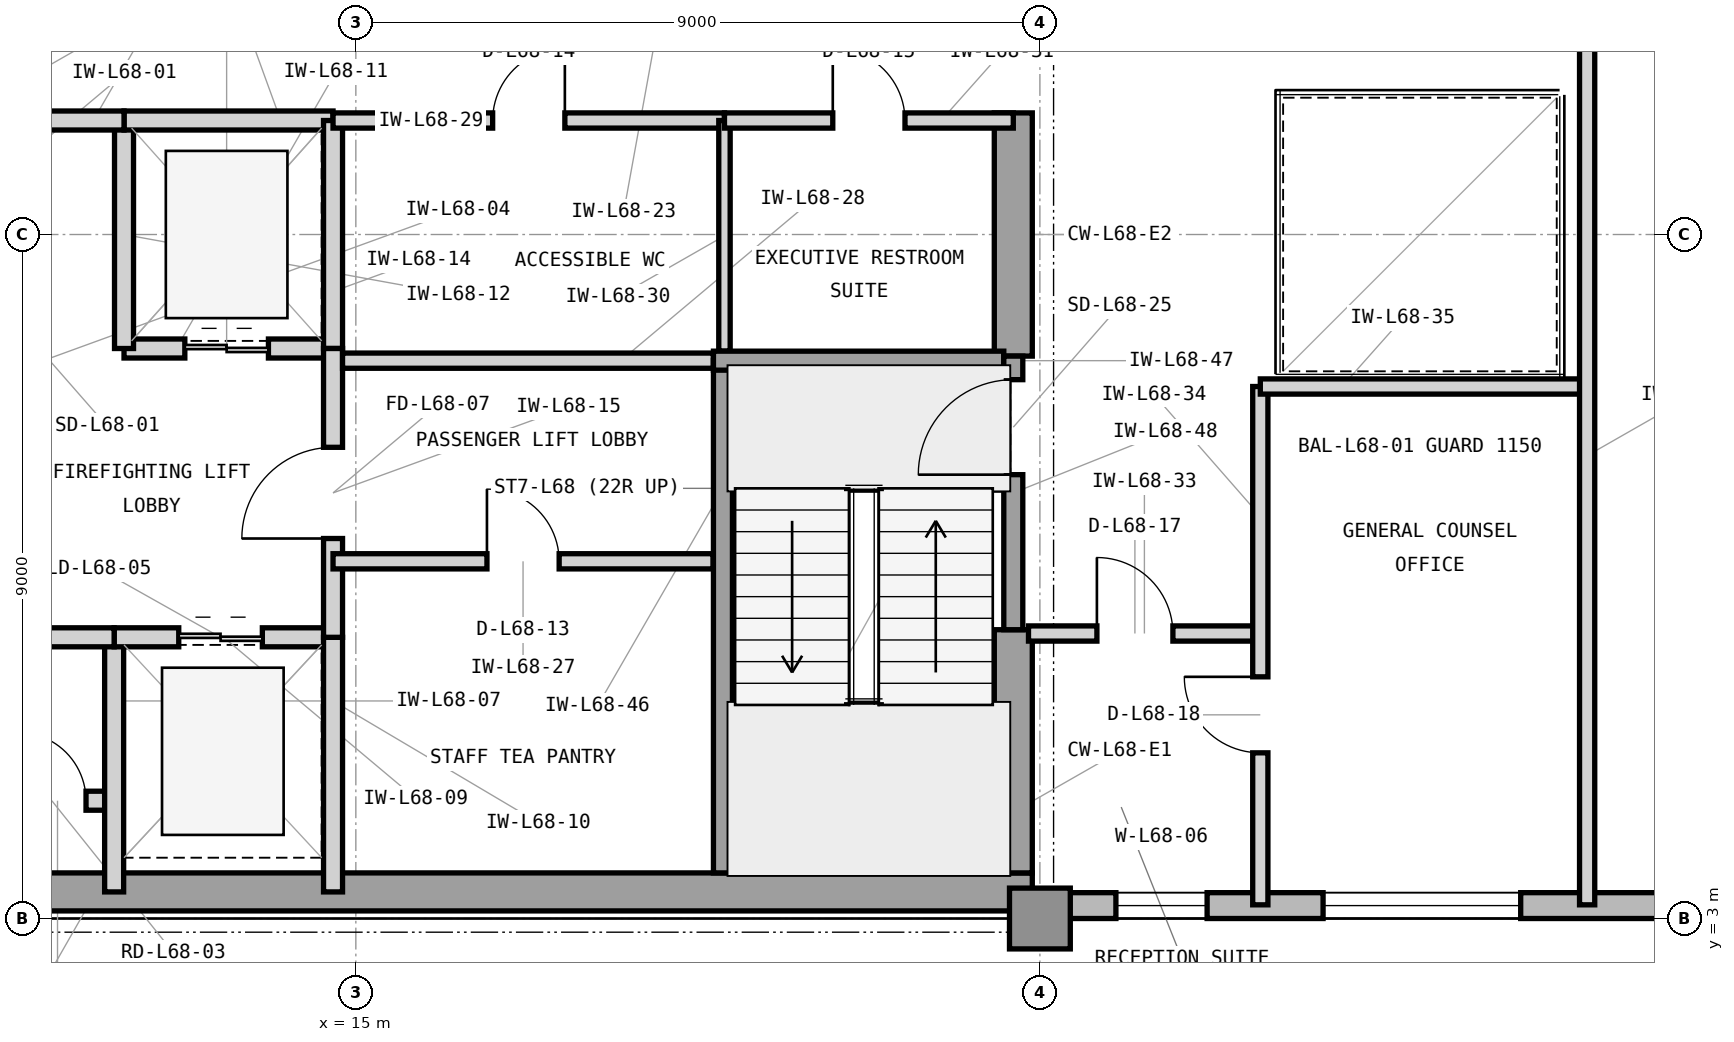
"""IFC4 building model, lengths in metres.
Left out: names, types, materials, properties, quantities, classifications, styles, units other than length and angle.
Written with IfcOpenShell. Run it as: python <this file> out.ifc"""

import sys

from ifc_helpers import new_model, si_unit, direction, frame, frame_2d, origin, origin_2d, place, context, subcontext, project, spatial, rectangle, extrude, element, fill, save


model = new_model("IFC4")
c1 = context("Model", 3, precision=1e-05, world=origin(), true_north=direction((0.0, 1.0)))
c2 = subcontext(c1, "Body", "Model", "MODEL_VIEW")
j1 = project(units=[si_unit("LENGTHUNIT", "METRE"), si_unit("PLANEANGLEUNIT", "RADIAN")], contexts=[c1])
p1 = place(None, origin())
s1 = spatial("IfcSite", under=j1, at=p1, CompositionType="ELEMENT")
p2 = place(p1, origin())
s2 = spatial("IfcBuilding", under=s1, at=p2, CompositionType="ELEMENT")
p3 = place(p2, frame((0.0, 0.0, 278.1)))
s3 = spatial("IfcBuildingStorey", under=s2, at=p3, CompositionType="ELEMENT", Elevation=278.1)
p4 = place(p3, frame((7.475, 3.35, 0.0), z_axis=(0.0, 0.0, 1.0), x_axis=(1.0, 0.0, 0.0)))
e1 = element("IfcWall", 1, at=p4, inside=s3, PredefinedType="SHEAR", context=c2, shape_type="SweptSolid", body=[
    extrude(rectangle(XDim=16.425, YDim=0.5, at=frame_2d((8.212, 0.0))), origin(), (0.0, 0.0, 1.0), 3.9),
])
p5 = place(p3, frame((23.65, 3.6, 0.0), z_axis=(0.0, 0.0, 1.0), x_axis=(0.0, 1.0, 0.0)))
e2 = element("IfcWall", 2, at=p5, inside=s3, PredefinedType="SHEAR", context=c2, shape_type="SweptSolid", body=[
    extrude(rectangle(XDim=3.2, YDim=0.5, at=frame_2d((1.6, 0.0))), origin(), (0.0, 0.0, 1.0), 3.9),
])
p6 = place(p3, frame((23.65, 10.4, 0.0), z_axis=(0.0, 0.0, 1.0), x_axis=(0.0, 1.0, 0.0)))
e3 = element("IfcWall", 3, at=p6, inside=s3, PredefinedType="SHEAR", context=c2, shape_type="SweptSolid", body=[
    extrude(rectangle(XDim=3.2, YDim=0.5, at=frame_2d((1.6, 0.0))), origin(), (0.0, 0.0, 1.0), 3.9),
])
p7 = place(p3, frame((24.0, 3.0, 0.0), z_axis=(0.0, 0.0, 1.0), x_axis=(1.0, 0.0, 0.0)))
e4 = element("IfcColumn", 4, at=p7, inside=s3, PredefinedType="COLUMN", context=c2, shape_type="SweptSolid", body=[
    extrude(rectangle(XDim=0.8, YDim=0.8, at=origin_2d()), origin(), (0.0, 0.0, 1.0), 3.9),
])
p8 = place(p3, frame((23.9, 3.17, 0.0), z_axis=(0.0, 0.0, 1.0), x_axis=(1.0, 0.0, 0.0)))
e5 = element("IfcWall", 5, at=p8, inside=s3, PredefinedType="STANDARD", context=c2, shape_type="SweptSolid", body=[
    extrude(rectangle(XDim=28.5, YDim=0.34, at=frame_2d((14.25, 0.0))), origin(), (0.0, 0.0, 1.0), 3.715),
])
p9 = place(p8, frame((10.575, 0.0, 0.8)))
e6 = element("IfcOpeningElement", 6, at=p9, cuts=e5, PredefinedType="OPENING", context=c2, shape_type="SweptSolid", body=[
    extrude(rectangle(XDim=2.6, YDim=2.35, at=frame_2d((1.3, 1.175))), frame((0.0, 0.18, 0.0), z_axis=(0.0, -1.0, 0.0), x_axis=(1.0, 0.0, 0.0)), (0.0, 0.0, 1.0), 0.36),
])
p10 = place(p8, frame((1.1, 0.0, 0.8)))
e7 = element("IfcOpeningElement", 7, at=p10, cuts=e5, PredefinedType="OPENING", context=c2, shape_type="SweptSolid", body=[
    extrude(rectangle(XDim=1.2, YDim=2.35, at=frame_2d((0.6, 1.175))), frame((0.0, 0.18, 0.0), z_axis=(0.0, -1.0, 0.0), x_axis=(1.0, 0.0, 0.0)), (0.0, 0.0, 1.0), 0.36),
])
p11 = place(p8, frame((3.826, 0.0, 0.8)))
e8 = element("IfcOpeningElement", 8, at=p11, cuts=e5, PredefinedType="OPENING", context=c2, shape_type="SweptSolid", body=[
    extrude(rectangle(XDim=2.6, YDim=2.35, at=frame_2d((1.3, 1.175))), frame((0.0, 0.18, 0.0), z_axis=(0.0, -1.0, 0.0), x_axis=(1.0, 0.0, 0.0)), (0.0, 0.0, 1.0), 0.36),
])
p12 = place(p8, frame((14.525, 0.0, 0.8)))
e9 = element("IfcOpeningElement", 9, at=p12, cuts=e5, PredefinedType="OPENING", context=c2, shape_type="SweptSolid", body=[
    extrude(rectangle(XDim=2.6, YDim=2.35, at=frame_2d((1.3, 1.175))), frame((0.0, 0.18, 0.0), z_axis=(0.0, -1.0, 0.0), x_axis=(1.0, 0.0, 0.0)), (0.0, 0.0, 1.0), 0.36),
])
p13 = place(p3, frame((10.33, 4.55, 0.0), z_axis=(0.0, 0.0, 1.0), x_axis=(1.0, 0.0, 0.0)))
e10 = element("IfcWall", 10, at=p13, inside=s3, PredefinedType="PARTITIONING", context=c2, shape_type="SweptSolid", body=[
    extrude(rectangle(XDim=1.49, YDim=0.25, at=frame_2d((0.745, 0.0))), origin(), (0.0, 0.0, 1.0), 3.705),
])
p14 = place(p13, frame((0.22, 0.0, 0.0)))
e11 = element("IfcOpeningElement", 11, at=p14, cuts=e10, PredefinedType="OPENING", context=c2, shape_type="SweptSolid", body=[
    extrude(rectangle(XDim=0.9, YDim=2.1, at=frame_2d((0.45, 1.05))), frame((0.0, 0.135, 0.0), z_axis=(0.0, -1.0, 0.0), x_axis=(1.0, 0.0, 0.0)), (0.0, 0.0, 1.0), 0.27),
])
p15 = place(p3, frame((11.82, 3.35, 0.0), z_axis=(0.0, 0.0, 1.0), x_axis=(0.0, 1.0, 0.0)))
e12 = element("IfcWall", 12, at=p15, inside=s3, PredefinedType="PARTITIONING", context=c2, shape_type="SweptSolid", body=[
    extrude(rectangle(XDim=3.35, YDim=0.25, at=frame_2d((1.675, 0.0))), origin(), (0.0, 0.0, 1.0), 3.705),
])
p16 = place(p3, frame((11.82, 6.7, 0.0), z_axis=(0.0, 0.0, 1.0), x_axis=(1.0, 0.0, 0.0)))
e13 = element("IfcWall", 13, at=p16, inside=s3, PredefinedType="PARTITIONING", context=c2, shape_type="SweptSolid", body=[
    extrude(rectangle(XDim=2.88, YDim=0.25, at=frame_2d((1.44, 0.0))), origin(), (0.0, 0.0, 1.0), 3.088),
])
p17 = place(p16, frame((0.85, 0.0, 0.0)))
e14 = element("IfcOpeningElement", 14, at=p17, cuts=e13, PredefinedType="OPENING", context=c2, shape_type="SweptSolid", body=[
    extrude(rectangle(XDim=1.1, YDim=2.25, at=frame_2d((0.55, 1.125))), frame((0.0, 0.135, 0.0), z_axis=(0.0, -1.0, 0.0), x_axis=(1.0, 0.0, 0.0)), (0.0, 0.0, 1.0), 0.27),
])
p18 = place(p3, frame((14.7, 3.35, 0.0), z_axis=(0.0, 0.0, 1.0), x_axis=(0.0, 1.0, 0.0)))
e15 = element("IfcWall", 15, at=p18, inside=s3, PredefinedType="PARTITIONING", context=c2, shape_type="SweptSolid", body=[
    extrude(rectangle(XDim=3.35, YDim=0.25, at=frame_2d((1.675, 0.0))), origin(), (0.0, 0.0, 1.0), 3.705),
])
p19 = place(p3, frame((11.95, 10.5, 0.0), z_axis=(0.0, 0.0, 1.0), x_axis=(1.0, 0.0, 0.0)))
e16 = element("IfcWall", 16, at=p19, inside=s3, PredefinedType="PARTITIONING", context=c2, shape_type="SweptSolid", body=[
    extrude(rectangle(XDim=2.75, YDim=0.25, at=frame_2d((1.375, 0.0))), origin(), (0.0, 0.0, 1.0), 3.088),
])
p20 = place(p19, frame((0.8, 0.0, 0.0)))
e17 = element("IfcOpeningElement", 17, at=p20, cuts=e16, PredefinedType="OPENING", context=c2, shape_type="SweptSolid", body=[
    extrude(rectangle(XDim=1.1, YDim=2.25, at=frame_2d((0.55, 1.125))), frame((0.0, 0.135, 0.0), z_axis=(0.0, -1.0, 0.0), x_axis=(1.0, 0.0, 0.0)), (0.0, 0.0, 1.0), 0.27),
])
p21 = place(p3, frame((11.95, 10.5, 0.0), z_axis=(0.0, 0.0, 1.0), x_axis=(0.0, 1.0, 0.0)))
e18 = element("IfcWall", 18, at=p21, inside=s3, PredefinedType="PARTITIONING", context=c2, shape_type="SweptSolid", body=[
    extrude(rectangle(XDim=3.0, YDim=0.25, at=frame_2d((1.5, 0.0))), origin(), (0.0, 0.0, 1.0), 3.705),
])
p22 = place(p3, frame((11.95, 13.5, 0.0), z_axis=(0.0, 0.0, 1.0), x_axis=(1.0, 0.0, 0.0)))
e19 = element("IfcWall", 19, at=p22, inside=s3, PredefinedType="PARTITIONING", context=c2, shape_type="SweptSolid", body=[
    extrude(rectangle(XDim=2.75, YDim=0.25, at=frame_2d((1.375, 0.0))), origin(), (0.0, 0.0, 1.0), 3.088),
])
p23 = place(p3, frame((14.7, 10.5, 0.0), z_axis=(0.0, 0.0, 1.0), x_axis=(0.0, 1.0, 0.0)))
e20 = element("IfcWall", 20, at=p23, inside=s3, PredefinedType="PARTITIONING", context=c2, shape_type="SweptSolid", body=[
    extrude(rectangle(XDim=3.0, YDim=0.25, at=frame_2d((1.5, 0.0))), origin(), (0.0, 0.0, 1.0), 3.705),
])
p24 = place(p3, frame((14.7, 6.7, 0.0), z_axis=(0.0, 0.0, 1.0), x_axis=(0.0, 1.0, 0.0)))
e21 = element("IfcWall", 21, at=p24, inside=s3, PredefinedType="PARTITIONING", context=c2, shape_type="SweptSolid", body=[
    extrude(rectangle(XDim=3.8, YDim=0.25, at=frame_2d((1.9, 0.0))), origin(), (0.0, 0.0, 1.0), 3.705),
])
p25 = place(p24, frame((1.3, 0.0, 0.0)))
e22 = element("IfcOpeningElement", 22, at=p25, cuts=e21, PredefinedType="OPENING", context=c2, shape_type="SweptSolid", body=[
    extrude(rectangle(XDim=1.2, YDim=2.2, at=frame_2d((0.6, 1.1))), frame((0.0, 0.135, 0.0), z_axis=(0.0, -1.0, 0.0), x_axis=(1.0, 0.0, 0.0)), (0.0, 0.0, 1.0), 0.27),
])
p26 = place(p3, frame((10.33, 13.5, 0.0), z_axis=(0.0, 0.0, 1.0), x_axis=(1.0, 0.0, 0.0)))
e23 = element("IfcWall", 23, at=p26, inside=s3, PredefinedType="PARTITIONING", context=c2, shape_type="SweptSolid", body=[
    extrude(rectangle(XDim=1.62, YDim=0.25, at=frame_2d((0.81, 0.0))), origin(), (0.0, 0.0, 1.0), 3.088),
])
p27 = place(p3, frame((10.33, 6.7, 0.0), z_axis=(0.0, 0.0, 1.0), x_axis=(1.0, 0.0, 0.0)))
e24 = element("IfcWall", 24, at=p27, inside=s3, PredefinedType="PARTITIONING", context=c2, shape_type="SweptSolid", body=[
    extrude(rectangle(XDim=1.49, YDim=0.25, at=frame_2d((0.745, 0.0))), origin(), (0.0, 0.0, 1.0), 3.088),
])
p28 = place(p3, frame((14.7, 7.7, 0.0), z_axis=(0.0, 0.0, 1.0), x_axis=(1.0, 0.0, 0.0)))
e25 = element("IfcWall", 25, at=p28, inside=s3, PredefinedType="PARTITIONING", context=c2, shape_type="SweptSolid", body=[
    extrude(rectangle(XDim=5.0, YDim=0.2, at=frame_2d((2.5, 0.0))), origin(), (0.0, 0.0, 1.0), 3.705),
])
p29 = place(p28, frame((2.025, 0.0, 0.0)))
e26 = element("IfcOpeningElement", 26, at=p29, cuts=e25, PredefinedType="OPENING", context=c2, shape_type="SweptSolid", body=[
    extrude(rectangle(XDim=0.95, YDim=2.1, at=frame_2d((0.475, 1.05))), frame((0.0, 0.11, 0.0), z_axis=(0.0, -1.0, 0.0), x_axis=(1.0, 0.0, 0.0)), (0.0, 0.0, 1.0), 0.22),
])
p30 = place(p3, frame((14.825, 10.34, 0.0), z_axis=(0.0, 0.0, 1.0), x_axis=(1.0, 0.0, 0.0)))
e27 = element("IfcWall", 27, at=p30, inside=s3, PredefinedType="PARTITIONING", context=c2, shape_type="SweptSolid", body=[
    extrude(rectangle(XDim=4.88, YDim=0.2, at=frame_2d((2.44, 0.0))), origin(), (0.0, 0.0, 1.0), 3.088),
])
p31 = place(p3, frame((14.7, 13.5, 0.0), z_axis=(0.0, 0.0, 1.0), x_axis=(1.0, 0.0, 0.0)))
e28 = element("IfcWall", 28, at=p31, inside=s3, PredefinedType="PARTITIONING", context=c2, shape_type="SweptSolid", body=[
    extrude(rectangle(XDim=5.15, YDim=0.2, at=frame_2d((2.575, 0.0))), origin(), (0.0, 0.0, 1.0), 3.088),
])
p32 = place(p31, frame((2.1, 0.0, 0.0)))
e29 = element("IfcOpeningElement", 29, at=p32, cuts=e28, PredefinedType="OPENING", context=c2, shape_type="SweptSolid", body=[
    extrude(rectangle(XDim=0.95, YDim=2.1, at=frame_2d((0.475, 1.05))), frame((0.0, 0.11, 0.0), z_axis=(0.0, -1.0, 0.0), x_axis=(1.0, 0.0, 0.0)), (0.0, 0.0, 1.0), 0.22),
])
p33 = place(p3, frame((19.85, 10.465, 0.0), z_axis=(0.0, 0.0, 1.0), x_axis=(0.0, 1.0, 0.0)))
e30 = element("IfcWall", 30, at=p33, inside=s3, PredefinedType="PARTITIONING", context=c2, shape_type="SweptSolid", body=[
    extrude(rectangle(XDim=3.035, YDim=0.15, at=frame_2d((1.518, 0.0))), origin(), (0.0, 0.0, 1.0), 3.705),
])
p34 = place(p3, frame((19.85, 13.5, 0.0), z_axis=(0.0, 0.0, 1.0), x_axis=(1.0, 0.0, 0.0)))
e31 = element("IfcWall", 31, at=p34, inside=s3, PredefinedType="PARTITIONING", context=c2, shape_type="SweptSolid", body=[
    extrude(rectangle(XDim=3.8, YDim=0.2, at=frame_2d((1.9, 0.0))), origin(), (0.0, 0.0, 1.0), 3.088),
])
p35 = place(p34, frame((1.425, 0.0, 0.0)))
e32 = element("IfcOpeningElement", 32, at=p35, cuts=e31, PredefinedType="OPENING", context=c2, shape_type="SweptSolid", body=[
    extrude(rectangle(XDim=0.95, YDim=2.1, at=frame_2d((0.475, 1.05))), frame((0.0, 0.11, 0.0), z_axis=(0.0, -1.0, 0.0), x_axis=(1.0, 0.0, 0.0)), (0.0, 0.0, 1.0), 0.22),
])
p36 = place(p3, frame((23.85, 6.75, 0.0), z_axis=(0.0, 0.0, 1.0), x_axis=(1.0, 0.0, 0.0)))
e33 = element("IfcWall", 33, at=p36, inside=s3, PredefinedType="PARTITIONING", context=c2, shape_type="SweptSolid", body=[
    extrude(rectangle(XDim=3.05, YDim=0.2, at=frame_2d((1.525, 0.0))), origin(), (0.0, 0.0, 1.0), 3.705),
])
p37 = place(p36, frame((0.9, 0.0, 0.0)))
e34 = element("IfcOpeningElement", 34, at=p37, cuts=e33, PredefinedType="OPENING", context=c2, shape_type="SweptSolid", body=[
    extrude(rectangle(XDim=1.0, YDim=2.15, at=frame_2d((0.5, 1.075))), frame((0.0, 0.11, 0.0), z_axis=(0.0, -1.0, 0.0), x_axis=(1.0, 0.0, 0.0)), (0.0, 0.0, 1.0), 0.22),
])
p38 = place(p3, frame((26.9, 3.18, 0.0), z_axis=(0.0, 0.0, 1.0), x_axis=(0.0, 1.0, 0.0)))
e35 = element("IfcWall", 35, at=p38, inside=s3, PredefinedType="PARTITIONING", context=c2, shape_type="SweptSolid", body=[
    extrude(rectangle(XDim=6.82, YDim=0.2, at=frame_2d((3.41, 0.0))), origin(), (0.0, 0.0, 1.0), 3.705),
])
p39 = place(p38, frame((2.0, 0.0, 0.0)))
e36 = element("IfcOpeningElement", 36, at=p39, cuts=e35, PredefinedType="OPENING", context=c2, shape_type="SweptSolid", body=[
    extrude(rectangle(XDim=1.0, YDim=2.15, at=frame_2d((0.5, 1.075))), frame((0.0, 0.11, 0.0), z_axis=(0.0, -1.0, 0.0), x_axis=(1.0, 0.0, 0.0)), (0.0, 0.0, 1.0), 0.22),
])
p40 = place(p3, frame((26.9, 10.0, 0.0), z_axis=(0.0, 0.0, 1.0), x_axis=(1.0, 0.0, 0.0)))
e37 = element("IfcWall", 37, at=p40, inside=s3, PredefinedType="PARTITIONING", context=c2, shape_type="SweptSolid", body=[
    extrude(rectangle(XDim=4.3, YDim=0.2, at=frame_2d((2.15, 0.0))), origin(), (0.0, 0.0, 1.0), 3.705),
])
p41 = place(p3, frame((31.2, 3.18, 0.0), z_axis=(0.0, 0.0, 1.0), x_axis=(0.0, 1.0, 0.0)))
e38 = element("IfcWall", 38, at=p41, inside=s3, PredefinedType="PARTITIONING", context=c2, shape_type="SweptSolid", body=[
    extrude(rectangle(XDim=11.82, YDim=0.2, at=frame_2d((5.91, 0.0))), origin(), (0.0, 0.0, 1.0), 3.705),
])
p42 = place(p3, frame((19.83, 3.6, 0.0), z_axis=(0.0, 0.0, 1.0), x_axis=(0.0, 1.0, 0.0)))
e39 = element("IfcWall", 39, at=p42, inside=s3, PredefinedType="SHEAR", context=c2, shape_type="SweptSolid", body=[
    extrude(rectangle(XDim=6.74, YDim=0.25, at=frame_2d((3.37, 0.0))), origin(), (0.0, 0.0, 1.0), 3.9),
])
p43 = place(p3, frame((19.705, 10.34, 0.0), z_axis=(0.0, 0.0, 1.0), x_axis=(1.0, 0.0, 0.0)))
e40 = element("IfcWall", 40, at=p43, inside=s3, PredefinedType="SHEAR", context=c2, shape_type="SweptSolid", body=[
    extrude(rectangle(XDim=3.82, YDim=0.25, at=frame_2d((1.91, 0.0))), origin(), (0.0, 0.0, 1.0), 3.9),
])
p44 = place(p3, frame((23.65, 6.8, 0.0), z_axis=(0.0, 0.0, 1.0), x_axis=(0.0, 1.0, 0.0)))
e41 = element("IfcWall", 41, at=p44, inside=s3, PredefinedType="SHEAR", context=c2, shape_type="SweptSolid", body=[
    extrude(rectangle(XDim=3.6, YDim=0.25, at=frame_2d((1.8, 0.0))), origin(), (0.0, 0.0, 1.0), 3.9),
])
p45 = place(p44, frame((2.04, 0.0, 0.0)))
e42 = element("IfcOpeningElement", 42, at=p45, cuts=e41, PredefinedType="OPENING", context=c2, shape_type="SweptSolid", body=[
    extrude(rectangle(XDim=1.25, YDim=2.2, at=frame_2d((0.625, 1.1))), frame((0.0, 0.135, 0.0), z_axis=(0.0, -1.0, 0.0), x_axis=(1.0, 0.0, 0.0)), (0.0, 0.0, 1.0), 0.27),
])
p46 = place(p14, origin())
e43 = element("IfcDoor", 43, at=p46, inside=s3, OperationType="SINGLE_SWING_LEFT", PredefinedType="TRAPDOOR", context=c2, shape_type="SweptSolid", body=[
    extrude(rectangle(XDim=0.9, YDim=2.1, at=frame_2d((0.45, 1.05))), frame((0.0, 0.025, 0.0), z_axis=(0.0, -1.0, 0.0), x_axis=(1.0, 0.0, 0.0)), (0.0, 0.0, 1.0), 0.05),
])
fill(e11, e43)
p47 = place(p17, origin())
e44 = element("IfcDoor", 44, at=p47, inside=s3, OperationType="DOUBLE_DOOR_SLIDING", PredefinedType="DOOR", context=c2, shape_type="SweptSolid", body=[
    extrude(rectangle(XDim=1.1, YDim=2.25, at=frame_2d((0.55, 1.125))), frame((0.0, 0.025, 0.0), z_axis=(0.0, -1.0, 0.0), x_axis=(1.0, 0.0, 0.0)), (0.0, 0.0, 1.0), 0.05),
])
fill(e14, e44)
p48 = place(p20, origin())
e45 = element("IfcDoor", 45, at=p48, inside=s3, OperationType="DOUBLE_DOOR_SLIDING", PredefinedType="DOOR", context=c2, shape_type="SweptSolid", body=[
    extrude(rectangle(XDim=1.1, YDim=2.25, at=frame_2d((0.55, 1.125))), frame((0.0, 0.025, 0.0), z_axis=(0.0, -1.0, 0.0), x_axis=(1.0, 0.0, 0.0)), (0.0, 0.0, 1.0), 0.05),
])
fill(e17, e45)
p49 = place(p25, origin())
e46 = element("IfcDoor", 46, at=p49, inside=s3, OperationType="SINGLE_SWING_LEFT", PredefinedType="DOOR", context=c2, shape_type="SweptSolid", body=[
    extrude(rectangle(XDim=1.2, YDim=2.2, at=frame_2d((0.6, 1.1))), frame((0.0, 0.025, 0.0), z_axis=(0.0, -1.0, 0.0), x_axis=(1.0, 0.0, 0.0)), (0.0, 0.0, 1.0), 0.05),
])
fill(e22, e46)
p50 = place(p29, origin())
e47 = element("IfcDoor", 47, at=p50, inside=s3, OperationType="SINGLE_SWING_LEFT", PredefinedType="DOOR", context=c2, shape_type="SweptSolid", body=[
    extrude(rectangle(XDim=0.95, YDim=2.1, at=frame_2d((0.475, 1.05))), frame((0.0, 0.025, 0.0), z_axis=(0.0, -1.0, 0.0), x_axis=(1.0, 0.0, 0.0)), (0.0, 0.0, 1.0), 0.05),
])
fill(e26, e47)
p51 = place(p32, origin())
e48 = element("IfcDoor", 48, at=p51, inside=s3, OperationType="SINGLE_SWING_RIGHT", PredefinedType="DOOR", context=c2, shape_type="SweptSolid", body=[
    extrude(rectangle(XDim=0.95, YDim=2.1, at=frame_2d((0.475, 1.05))), frame((0.0, 0.025, 0.0), z_axis=(0.0, -1.0, 0.0), x_axis=(1.0, 0.0, 0.0)), (0.0, 0.0, 1.0), 0.05),
])
fill(e29, e48)
p52 = place(p35, origin())
e49 = element("IfcDoor", 49, at=p52, inside=s3, OperationType="SINGLE_SWING_LEFT", PredefinedType="DOOR", context=c2, shape_type="SweptSolid", body=[
    extrude(rectangle(XDim=0.95, YDim=2.1, at=frame_2d((0.475, 1.05))), frame((0.0, 0.025, 0.0), z_axis=(0.0, -1.0, 0.0), x_axis=(1.0, 0.0, 0.0)), (0.0, 0.0, 1.0), 0.05),
])
fill(e32, e49)
p53 = place(p37, origin())
e50 = element("IfcDoor", 50, at=p53, inside=s3, OperationType="SINGLE_SWING_LEFT", PredefinedType="DOOR", context=c2, shape_type="SweptSolid", body=[
    extrude(rectangle(XDim=1.0, YDim=2.15, at=frame_2d((0.5, 1.075))), frame((0.0, 0.025, 0.0), z_axis=(0.0, -1.0, 0.0), x_axis=(1.0, 0.0, 0.0)), (0.0, 0.0, 1.0), 0.05),
])
fill(e34, e50)
p54 = place(p39, origin())
e51 = element("IfcDoor", 51, at=p54, inside=s3, OperationType="SINGLE_SWING_RIGHT", PredefinedType="DOOR", context=c2, shape_type="SweptSolid", body=[
    extrude(rectangle(XDim=1.0, YDim=2.15, at=frame_2d((0.5, 1.075))), frame((0.0, 0.025, 0.0), z_axis=(0.0, -1.0, 0.0), x_axis=(1.0, 0.0, 0.0)), (0.0, 0.0, 1.0), 0.05),
])
fill(e36, e51)
p55 = place(p45, origin())
e52 = element("IfcDoor", 52, at=p55, inside=s3, OperationType="SINGLE_SWING_LEFT", PredefinedType="DOOR", context=c2, shape_type="SweptSolid", body=[
    extrude(rectangle(XDim=1.25, YDim=2.2, at=frame_2d((0.625, 1.1))), frame((0.0, 0.025, 0.0), z_axis=(0.0, -1.0, 0.0), x_axis=(1.0, 0.0, 0.0)), (0.0, 0.0, 1.0), 0.05),
])
fill(e42, e52)
p56 = place(p10, origin())
e53 = element("IfcWindow", 53, at=p56, inside=s3, PartitioningType="SINGLE_PANEL", PredefinedType="WINDOW", context=c2, shape_type="SweptSolid", body=[
    extrude(rectangle(XDim=1.2, YDim=2.35, at=frame_2d((0.6, 1.175))), frame((0.0, 0.11, 0.0), z_axis=(0.0, -1.0, 0.0), x_axis=(1.0, 0.0, 0.0)), (0.0, 0.0, 1.0), 0.06),
])
fill(e7, e53)
p57 = place(p11, origin())
e54 = element("IfcWindow", 54, at=p57, inside=s3, PartitioningType="SINGLE_PANEL", PredefinedType="WINDOW", context=c2, shape_type="SweptSolid", body=[
    extrude(rectangle(XDim=2.6, YDim=2.35, at=frame_2d((1.3, 1.175))), frame((0.0, 0.11, 0.0), z_axis=(0.0, -1.0, 0.0), x_axis=(1.0, 0.0, 0.0)), (0.0, 0.0, 1.0), 0.06),
])
fill(e8, e54)
save(model, sys.argv[1])
